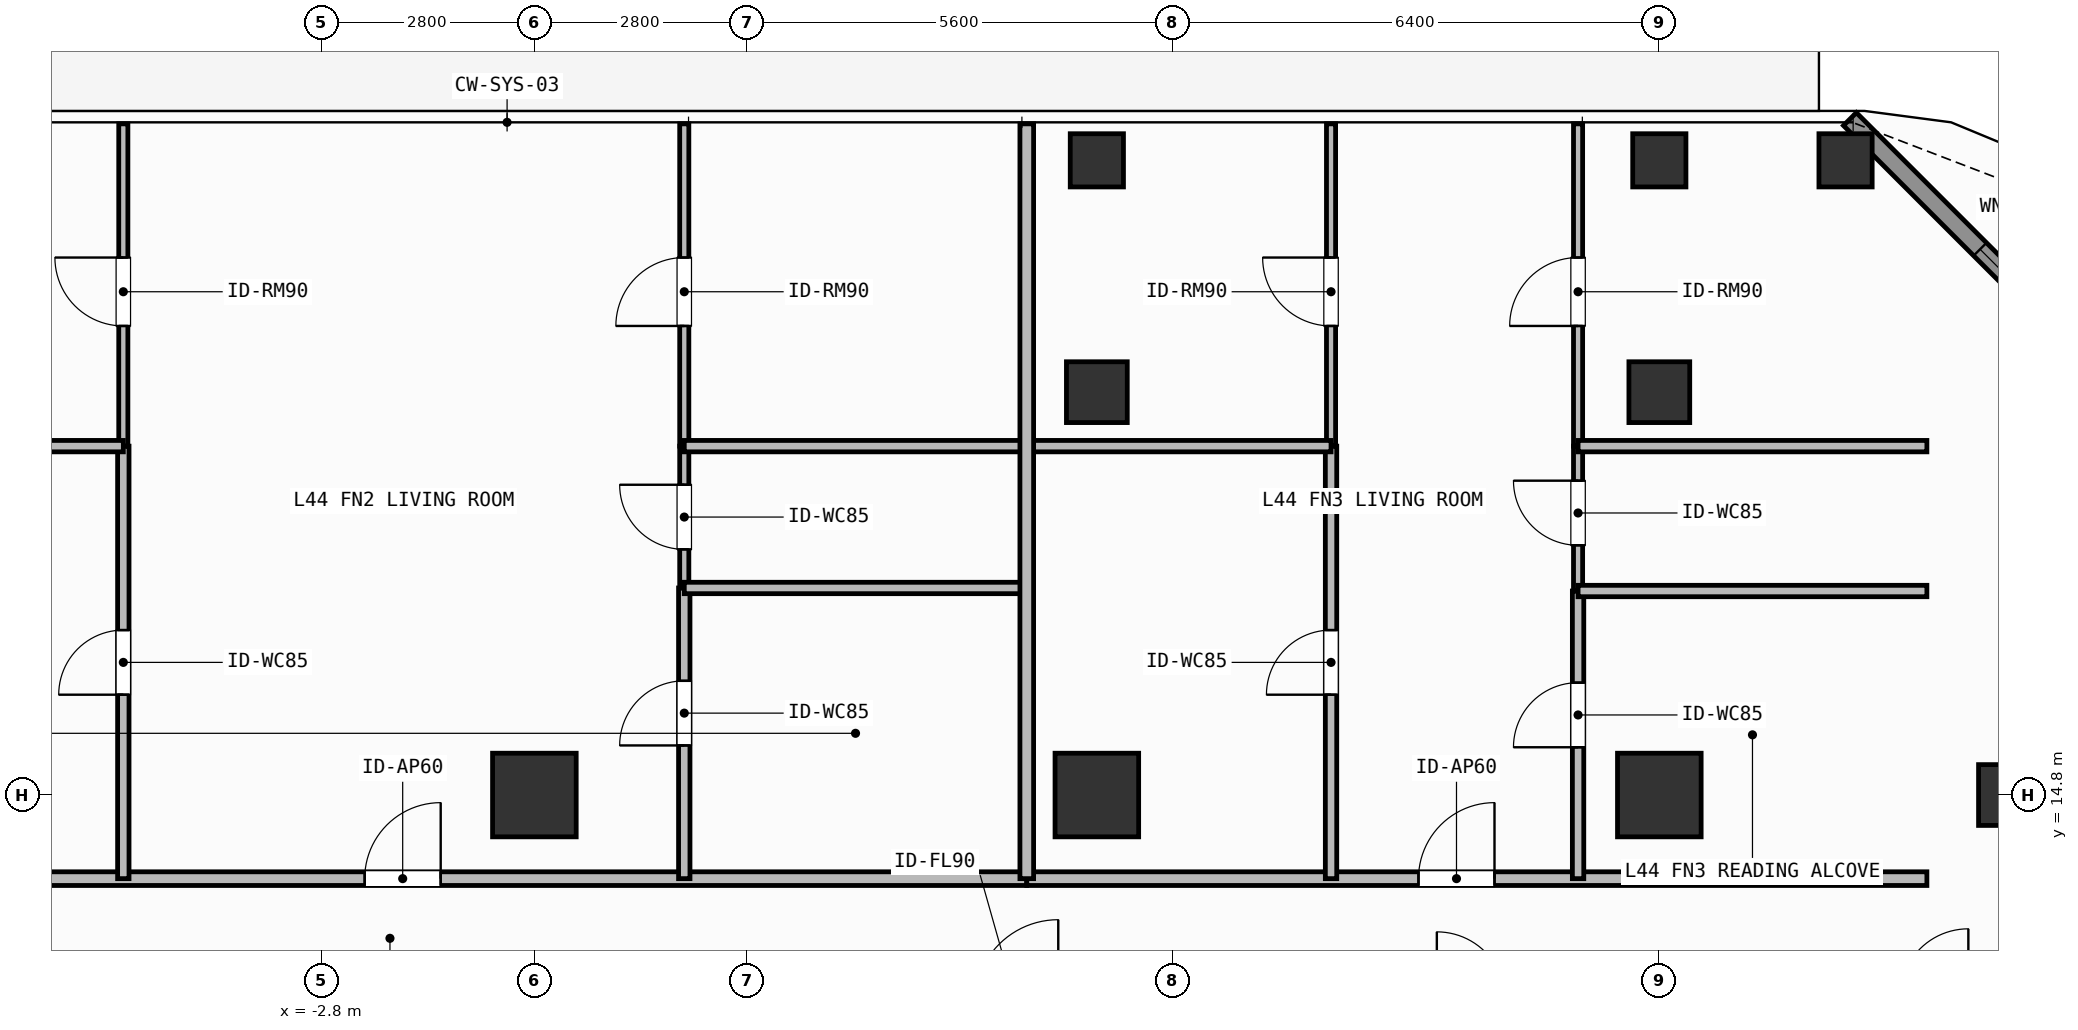
"""IFC4 building model, lengths in metres.
Left out: names, types, materials, properties, quantities, classifications, styles, units other than length and angle.
Written with IfcOpenShell. Run it as: python <this file> out.ifc"""

import sys

from ifc_helpers import new_model, si_unit, direction, frame, frame_2d, origin, origin_2d, place, context, subcontext, project, spatial, rectangle, hollow_rectangle, extrude, element, fill, save


model = new_model("IFC4")
c1 = context("Model", 3, precision=1e-05, world=origin(), true_north=direction((0.0, 1.0)))
c2 = subcontext(c1, "Body", "Model", "MODEL_VIEW")
j1 = project(units=[si_unit("LENGTHUNIT", "METRE"), si_unit("PLANEANGLEUNIT", "RADIAN")], contexts=[c1])
p1 = place(None, origin())
s1 = spatial("IfcSite", under=j1, at=p1, CompositionType="ELEMENT")
p2 = place(p1, origin())
s2 = spatial("IfcBuilding", under=s1, at=p2, CompositionType="ELEMENT")
p3 = place(p2, frame((0.0, 0.0, 179.7)))
s3 = spatial("IfcBuildingStorey", under=s2, at=p3, CompositionType="ELEMENT", Elevation=179.7)
for number, where, z_axis, x_axis in (
    (1, (0.0, 14.8, 0.0), (0.0, 0.0, 1.0), (1.0, 0.0, 0.0)),
    (2, (7.4, 14.8, 0.0), (0.0, 0.0, 1.0), (1.0, 0.0, 0.0)),
    (3, (14.8, 14.8, 0.0), (0.0, 0.0, 1.0), (1.0, 0.0, 0.0)),
):
    element("IfcColumn", number, at=place(p3, frame(where, z_axis=z_axis, x_axis=x_axis)), inside=s3, PredefinedType="COLUMN", context=c2, shape_type="SweptSolid", body=[
        extrude(rectangle(XDim=1.1, YDim=1.1, at=origin_2d()), origin(), (0.0, 0.0, 1.0), 3.9),
    ])
for number, where, z_axis, x_axis in (
    (4, (19.4, 14.8, 0.0), (0.0, 0.0, 1.0), (1.0, 0.0, 0.0)),
    (5, (7.4, 20.1, 0.0), (0.0, 0.0, 1.0), (1.0, 0.0, 0.0)),
    (6, (14.8, 20.1, 0.0), (0.0, 0.0, 1.0), (1.0, 0.0, 0.0)),
):
    element("IfcColumn", number, at=place(p3, frame(where, z_axis=z_axis, x_axis=x_axis)), inside=s3, PredefinedType="COLUMN", context=c2, shape_type="SweptSolid", body=[
        extrude(hollow_rectangle(XDim=0.8, YDim=0.8, WallThickness=0.036, at=origin_2d()), origin(), (0.0, 0.0, 1.0), 3.9),
    ])
for number, where, z_axis, x_axis in (
    (7, (17.25, 23.15, 0.0), (0.0, 0.0, 1.0), (1.0, 0.0, 0.0)),
    (8, (7.4, 23.15, 0.0), (0.0, 0.0, 1.0), (1.0, 0.0, 0.0)),
    (9, (14.8, 23.15, 0.0), (0.0, 0.0, 1.0), (1.0, 0.0, 0.0)),
):
    element("IfcColumn", number, at=place(p3, frame(where, z_axis=z_axis, x_axis=x_axis)), inside=s3, PredefinedType="COLUMN", context=c2, shape_type="SweptSolid", body=[
        extrude(hollow_rectangle(XDim=0.7, YDim=0.7, WallThickness=0.032, at=origin_2d()), origin(), (0.0, 0.0, 1.0), 3.9),
    ])
p4 = place(p3, frame((17.308, 23.692, 0.0), z_axis=(0.0, 0.0, 1.0), x_axis=(0.707106781187, -0.707106781187, 0.0)))
e10 = element("IfcWall", 10, at=p4, inside=s3, PredefinedType="SOLIDWALL", context=c2, shape_type="SweptSolid", body=[
    extrude(rectangle(XDim=6.343, YDim=0.24, at=frame_2d((3.171, 0.0))), origin(), (0.0, 0.0, 1.0), 3.68),
])
p5 = place(p4, frame((2.421, 0.0, 0.8)))
e11 = element("IfcOpeningElement", 11, at=p5, cuts=e10, PredefinedType="OPENING", context=c2, shape_type="SweptSolid", body=[
    extrude(rectangle(XDim=1.5, YDim=1.85, at=frame_2d((0.75, 0.925))), frame((0.0, 0.13, 0.0), z_axis=(0.0, -1.0, 0.0), x_axis=(1.0, 0.0, 0.0)), (0.0, 0.0, 1.0), 0.26),
])
p6 = place(p3, frame((-12.28, 13.7, 0.0), z_axis=(0.0, 0.0, 1.0), x_axis=(1.0, 0.0, 0.0)))
e12 = element("IfcWall", 12, at=p6, inside=s3, PredefinedType="PARTITIONING", context=c2, shape_type="SweptSolid", body=[
    extrude(rectangle(XDim=18.758, YDim=0.18, at=frame_2d((9.379, 0.0))), origin(), (0.0, 0.0, 1.0), 3.68),
])
p7 = place(p6, frame((10.048, 0.0, 0.0)))
e13 = element("IfcOpeningElement", 13, at=p7, cuts=e12, PredefinedType="OPENING", context=c2, shape_type="SweptSolid", body=[
    extrude(rectangle(XDim=1.0, YDim=2.2, at=frame_2d((0.5, 1.1))), frame((0.0, 0.1, 0.0), z_axis=(0.0, -1.0, 0.0), x_axis=(1.0, 0.0, 0.0)), (0.0, 0.0, 1.0), 0.2),
])
p8 = place(p3, frame((-5.408, 13.7, 0.0), z_axis=(0.0, 0.0, 1.0), x_axis=(0.0, 1.0, 0.0)))
e14 = element("IfcWall", 14, at=p8, inside=s3, PredefinedType="PARTITIONING", context=c2, shape_type="SweptSolid", body=[
    extrude(rectangle(XDim=5.69, YDim=0.15, at=frame_2d((2.845, 0.0))), origin(), (0.0, 0.0, 1.0), 3.68),
])
p9 = place(p8, frame((2.42, 0.0, 0.0)))
e15 = element("IfcOpeningElement", 15, at=p9, cuts=e14, PredefinedType="OPENING", context=c2, shape_type="SweptSolid", body=[
    extrude(rectangle(XDim=0.85, YDim=2.1, at=frame_2d((0.425, 1.05))), frame((0.0, 0.085, 0.0), z_axis=(0.0, -1.0, 0.0), x_axis=(1.0, 0.0, 0.0)), (0.0, 0.0, 1.0), 0.17),
])
p10 = place(p3, frame((-5.408, 19.39, 0.0), z_axis=(0.0, 0.0, 1.0), x_axis=(0.0, 1.0, 0.0)))
e16 = element("IfcWall", 16, at=p10, inside=s3, PredefinedType="PARTITIONING", context=c2, shape_type="SweptSolid", body=[
    extrude(rectangle(XDim=4.24, YDim=0.12, at=frame_2d((2.12, 0.0))), origin(), (0.0, 0.0, 1.0), 3.68),
])
p11 = place(p10, frame((1.581, 0.0, 0.0)))
e17 = element("IfcOpeningElement", 17, at=p11, cuts=e16, PredefinedType="OPENING", context=c2, shape_type="SweptSolid", body=[
    extrude(rectangle(XDim=0.9, YDim=2.1, at=frame_2d((0.45, 1.05))), frame((0.0, 0.07, 0.0), z_axis=(0.0, -1.0, 0.0), x_axis=(1.0, 0.0, 0.0)), (0.0, 0.0, 1.0), 0.14),
])
p12 = place(p3, frame((1.972, 13.7, 0.0), z_axis=(0.0, 0.0, 1.0), x_axis=(0.0, 1.0, 0.0)))
e18 = element("IfcWall", 18, at=p12, inside=s3, PredefinedType="PARTITIONING", context=c2, shape_type="SweptSolid", body=[
    extrude(rectangle(XDim=3.824, YDim=0.15, at=frame_2d((1.912, 0.0))), origin(), (0.0, 0.0, 1.0), 3.68),
])
p13 = place(p12, frame((1.752, 0.0, 0.0)))
e19 = element("IfcOpeningElement", 19, at=p13, cuts=e18, PredefinedType="OPENING", context=c2, shape_type="SweptSolid", body=[
    extrude(rectangle(XDim=0.85, YDim=2.1, at=frame_2d((0.425, 1.05))), frame((0.0, 0.085, 0.0), z_axis=(0.0, -1.0, 0.0), x_axis=(1.0, 0.0, 0.0)), (0.0, 0.0, 1.0), 0.17),
])
p14 = place(p3, frame((1.972, 17.524, 0.0), z_axis=(0.0, 0.0, 1.0), x_axis=(0.0, 1.0, 0.0)))
e20 = element("IfcWall", 20, at=p14, inside=s3, PredefinedType="PARTITIONING", context=c2, shape_type="SweptSolid", body=[
    extrude(rectangle(XDim=1.866, YDim=0.12, at=frame_2d((0.933, 0.0))), origin(), (0.0, 0.0, 1.0), 3.68),
])
p15 = place(p14, frame((0.508, 0.0, 0.0)))
e21 = element("IfcOpeningElement", 21, at=p15, cuts=e20, PredefinedType="OPENING", context=c2, shape_type="SweptSolid", body=[
    extrude(rectangle(XDim=0.85, YDim=2.1, at=frame_2d((0.425, 1.05))), frame((0.0, 0.07, 0.0), z_axis=(0.0, -1.0, 0.0), x_axis=(1.0, 0.0, 0.0)), (0.0, 0.0, 1.0), 0.14),
])
p16 = place(p3, frame((1.972, 19.39, 0.0), z_axis=(0.0, 0.0, 1.0), x_axis=(0.0, 1.0, 0.0)))
e22 = element("IfcWall", 22, at=p16, inside=s3, PredefinedType="PARTITIONING", context=c2, shape_type="SweptSolid", body=[
    extrude(rectangle(XDim=4.24, YDim=0.12, at=frame_2d((2.12, 0.0))), origin(), (0.0, 0.0, 1.0), 3.68),
])
p17 = place(p16, frame((1.581, 0.0, 0.0)))
e23 = element("IfcOpeningElement", 23, at=p17, cuts=e22, PredefinedType="OPENING", context=c2, shape_type="SweptSolid", body=[
    extrude(rectangle(XDim=0.9, YDim=2.1, at=frame_2d((0.45, 1.05))), frame((0.0, 0.07, 0.0), z_axis=(0.0, -1.0, 0.0), x_axis=(1.0, 0.0, 0.0)), (0.0, 0.0, 1.0), 0.14),
])
p18 = place(p3, frame((6.478, 13.7, 0.0), z_axis=(0.0, 0.0, 1.0), x_axis=(1.0, 0.0, 0.0)))
e24 = element("IfcWall", 24, at=p18, inside=s3, PredefinedType="PARTITIONING", context=c2, shape_type="SweptSolid", body=[
    extrude(rectangle(XDim=11.842, YDim=0.18, at=frame_2d((5.921, 0.0))), origin(), (0.0, 0.0, 1.0), 3.68),
])
p19 = place(p18, frame((5.154, 0.0, 0.0)))
e25 = element("IfcOpeningElement", 25, at=p19, cuts=e24, PredefinedType="OPENING", context=c2, shape_type="SweptSolid", body=[
    extrude(rectangle(XDim=1.0, YDim=2.2, at=frame_2d((0.5, 1.1))), frame((0.0, 0.1, 0.0), z_axis=(0.0, -1.0, 0.0), x_axis=(1.0, 0.0, 0.0)), (0.0, 0.0, 1.0), 0.2),
])
p20 = place(p3, frame((10.481, 13.7, 0.0), z_axis=(0.0, 0.0, 1.0), x_axis=(0.0, 1.0, 0.0)))
e26 = element("IfcWall", 26, at=p20, inside=s3, PredefinedType="PARTITIONING", context=c2, shape_type="SweptSolid", body=[
    extrude(rectangle(XDim=5.69, YDim=0.15, at=frame_2d((2.845, 0.0))), origin(), (0.0, 0.0, 1.0), 3.68),
])
p21 = place(p20, frame((2.42, 0.0, 0.0)))
e27 = element("IfcOpeningElement", 27, at=p21, cuts=e26, PredefinedType="OPENING", context=c2, shape_type="SweptSolid", body=[
    extrude(rectangle(XDim=0.85, YDim=2.1, at=frame_2d((0.425, 1.05))), frame((0.0, 0.085, 0.0), z_axis=(0.0, -1.0, 0.0), x_axis=(1.0, 0.0, 0.0)), (0.0, 0.0, 1.0), 0.17),
])
p22 = place(p3, frame((10.481, 19.39, 0.0), z_axis=(0.0, 0.0, 1.0), x_axis=(0.0, 1.0, 0.0)))
e28 = element("IfcWall", 28, at=p22, inside=s3, PredefinedType="PARTITIONING", context=c2, shape_type="SweptSolid", body=[
    extrude(rectangle(XDim=4.24, YDim=0.12, at=frame_2d((2.12, 0.0))), origin(), (0.0, 0.0, 1.0), 3.68),
])
p23 = place(p22, frame((1.581, 0.0, 0.0)))
e29 = element("IfcOpeningElement", 29, at=p23, cuts=e28, PredefinedType="OPENING", context=c2, shape_type="SweptSolid", body=[
    extrude(rectangle(XDim=0.9, YDim=2.1, at=frame_2d((0.45, 1.05))), frame((0.0, 0.07, 0.0), z_axis=(0.0, -1.0, 0.0), x_axis=(1.0, 0.0, 0.0)), (0.0, 0.0, 1.0), 0.14),
])
p24 = place(p3, frame((13.731, 13.7, 0.0), z_axis=(0.0, 0.0, 1.0), x_axis=(0.0, 1.0, 0.0)))
e30 = element("IfcWall", 30, at=p24, inside=s3, PredefinedType="PARTITIONING", context=c2, shape_type="SweptSolid", body=[
    extrude(rectangle(XDim=3.784, YDim=0.15, at=frame_2d((1.892, 0.0))), origin(), (0.0, 0.0, 1.0), 3.68),
])
p25 = place(p24, frame((1.729, 0.0, 0.0)))
e31 = element("IfcOpeningElement", 31, at=p25, cuts=e30, PredefinedType="OPENING", context=c2, shape_type="SweptSolid", body=[
    extrude(rectangle(XDim=0.85, YDim=2.1, at=frame_2d((0.425, 1.05))), frame((0.0, 0.085, 0.0), z_axis=(0.0, -1.0, 0.0), x_axis=(1.0, 0.0, 0.0)), (0.0, 0.0, 1.0), 0.17),
])
p26 = place(p3, frame((13.731, 17.484, 0.0), z_axis=(0.0, 0.0, 1.0), x_axis=(0.0, 1.0, 0.0)))
e32 = element("IfcWall", 32, at=p26, inside=s3, PredefinedType="PARTITIONING", context=c2, shape_type="SweptSolid", body=[
    extrude(rectangle(XDim=1.906, YDim=0.12, at=frame_2d((0.953, 0.0))), origin(), (0.0, 0.0, 1.0), 3.68),
])
p27 = place(p26, frame((0.602, 0.0, 0.0)))
e33 = element("IfcOpeningElement", 33, at=p27, cuts=e32, PredefinedType="OPENING", context=c2, shape_type="SweptSolid", body=[
    extrude(rectangle(XDim=0.85, YDim=2.1, at=frame_2d((0.425, 1.05))), frame((0.0, 0.07, 0.0), z_axis=(0.0, -1.0, 0.0), x_axis=(1.0, 0.0, 0.0)), (0.0, 0.0, 1.0), 0.14),
])
p28 = place(p3, frame((13.731, 19.39, 0.0), z_axis=(0.0, 0.0, 1.0), x_axis=(0.0, 1.0, 0.0)))
e34 = element("IfcWall", 34, at=p28, inside=s3, PredefinedType="PARTITIONING", context=c2, shape_type="SweptSolid", body=[
    extrude(rectangle(XDim=4.24, YDim=0.12, at=frame_2d((2.12, 0.0))), origin(), (0.0, 0.0, 1.0), 3.68),
])
p29 = place(p28, frame((1.581, 0.0, 0.0)))
e35 = element("IfcOpeningElement", 35, at=p29, cuts=e34, PredefinedType="OPENING", context=c2, shape_type="SweptSolid", body=[
    extrude(rectangle(XDim=0.9, YDim=2.1, at=frame_2d((0.45, 1.05))), frame((0.0, 0.07, 0.0), z_axis=(0.0, -1.0, 0.0), x_axis=(1.0, 0.0, 0.0)), (0.0, 0.0, 1.0), 0.14),
])
p30 = place(p3, frame((-12.28, 19.39, 0.0), z_axis=(0.0, 0.0, 1.0), x_axis=(1.0, 0.0, 0.0)))
e36 = element("IfcWall", 36, at=p30, inside=s3, PredefinedType="PARTITIONING", context=c2, shape_type="SweptSolid", body=[
    extrude(rectangle(XDim=6.872, YDim=0.15, at=frame_2d((3.436, 0.0))), origin(), (0.0, 0.0, 1.0), 3.68),
])
for number, where, z_axis, x_axis in (
    (37, (1.972, 17.524, 0.0), (0.0, 0.0, 1.0), (1.0, 0.0, 0.0)),
    (38, (1.972, 19.39, 0.0), (0.0, 0.0, 1.0), (1.0, 0.0, 0.0)),
):
    element("IfcWall", number, at=place(p3, frame(where, z_axis=z_axis, x_axis=x_axis)), inside=s3, PredefinedType="PARTITIONING", context=c2, shape_type="SweptSolid", body=[
        extrude(rectangle(XDim=4.506, YDim=0.15, at=frame_2d((2.253, 0.0))), origin(), (0.0, 0.0, 1.0), 3.68),
    ])
p31 = place(p3, frame((6.478, 19.39, 0.0), z_axis=(0.0, 0.0, 1.0), x_axis=(1.0, 0.0, 0.0)))
e39 = element("IfcWall", 39, at=p31, inside=s3, PredefinedType="PARTITIONING", context=c2, shape_type="SweptSolid", body=[
    extrude(rectangle(XDim=4.003, YDim=0.15, at=frame_2d((2.001, 0.0))), origin(), (0.0, 0.0, 1.0), 3.68),
])
for number, where, z_axis, x_axis in (
    (40, (13.731, 17.484, 0.0), (0.0, 0.0, 1.0), (1.0, 0.0, 0.0)),
    (41, (13.731, 19.39, 0.0), (0.0, 0.0, 1.0), (1.0, 0.0, 0.0)),
):
    element("IfcWall", number, at=place(p3, frame(where, z_axis=z_axis, x_axis=x_axis)), inside=s3, PredefinedType="PARTITIONING", context=c2, shape_type="SweptSolid", body=[
        extrude(rectangle(XDim=4.589, YDim=0.15, at=frame_2d((2.294, 0.0))), origin(), (0.0, 0.0, 1.0), 3.68),
    ])
p32 = place(p3, frame((6.478, 13.7, 0.0), z_axis=(0.0, 0.0, 1.0), x_axis=(0.0, 1.0, 0.0)))
e42 = element("IfcWall", 42, at=p32, inside=s3, PredefinedType="PARTITIONING", context=c2, shape_type="SweptSolid", body=[
    extrude(rectangle(XDim=9.93, YDim=0.18, at=frame_2d((4.965, 0.0))), origin(), (0.0, 0.0, 1.0), 3.68),
])
p33 = place(p5, origin())
e43 = element("IfcWindow", 43, at=p33, inside=s3, PartitioningType="SINGLE_PANEL", PredefinedType="WINDOW", context=c2, shape_type="SweptSolid", body=[
    extrude(rectangle(XDim=1.5, YDim=1.85, at=frame_2d((0.75, 0.925))), frame((0.0, 0.03, 0.0), z_axis=(0.0, -1.0, 0.0), x_axis=(1.0, 0.0, 0.0)), (0.0, 0.0, 1.0), 0.06),
])
fill(e11, e43)
p34 = place(p7, origin())
e44 = element("IfcDoor", 44, at=p34, inside=s3, OperationType="SINGLE_SWING_RIGHT", PredefinedType="DOOR", context=c2, shape_type="SweptSolid", body=[
    extrude(rectangle(XDim=1.0, YDim=2.2, at=frame_2d((0.5, 1.1))), frame((0.0, 0.025, 0.0), z_axis=(0.0, -1.0, 0.0), x_axis=(1.0, 0.0, 0.0)), (0.0, 0.0, 1.0), 0.05),
])
fill(e13, e44)
p35 = place(p9, origin())
e45 = element("IfcDoor", 45, at=p35, inside=s3, OperationType="SINGLE_SWING_LEFT", PredefinedType="DOOR", context=c2, shape_type="SweptSolid", body=[
    extrude(rectangle(XDim=0.85, YDim=2.1, at=frame_2d((0.425, 1.05))), frame((0.0, 0.025, 0.0), z_axis=(0.0, -1.0, 0.0), x_axis=(1.0, 0.0, 0.0)), (0.0, 0.0, 1.0), 0.05),
])
fill(e15, e45)
p36 = place(p11, origin())
e46 = element("IfcDoor", 46, at=p36, inside=s3, OperationType="SINGLE_SWING_RIGHT", PredefinedType="DOOR", context=c2, shape_type="SweptSolid", body=[
    extrude(rectangle(XDim=0.9, YDim=2.1, at=frame_2d((0.45, 1.05))), frame((0.0, 0.025, 0.0), z_axis=(0.0, -1.0, 0.0), x_axis=(1.0, 0.0, 0.0)), (0.0, 0.0, 1.0), 0.05),
])
fill(e17, e46)
p37 = place(p13, origin())
e47 = element("IfcDoor", 47, at=p37, inside=s3, OperationType="SINGLE_SWING_LEFT", PredefinedType="DOOR", context=c2, shape_type="SweptSolid", body=[
    extrude(rectangle(XDim=0.85, YDim=2.1, at=frame_2d((0.425, 1.05))), frame((0.0, 0.025, 0.0), z_axis=(0.0, -1.0, 0.0), x_axis=(1.0, 0.0, 0.0)), (0.0, 0.0, 1.0), 0.05),
])
fill(e19, e47)
p38 = place(p15, origin())
e48 = element("IfcDoor", 48, at=p38, inside=s3, OperationType="SINGLE_SWING_RIGHT", PredefinedType="DOOR", context=c2, shape_type="SweptSolid", body=[
    extrude(rectangle(XDim=0.85, YDim=2.1, at=frame_2d((0.425, 1.05))), frame((0.0, 0.025, 0.0), z_axis=(0.0, -1.0, 0.0), x_axis=(1.0, 0.0, 0.0)), (0.0, 0.0, 1.0), 0.05),
])
fill(e21, e48)
p39 = place(p17, origin())
e49 = element("IfcDoor", 49, at=p39, inside=s3, OperationType="SINGLE_SWING_LEFT", PredefinedType="DOOR", context=c2, shape_type="SweptSolid", body=[
    extrude(rectangle(XDim=0.9, YDim=2.1, at=frame_2d((0.45, 1.05))), frame((0.0, 0.025, 0.0), z_axis=(0.0, -1.0, 0.0), x_axis=(1.0, 0.0, 0.0)), (0.0, 0.0, 1.0), 0.05),
])
fill(e23, e49)
p40 = place(p19, origin())
e50 = element("IfcDoor", 50, at=p40, inside=s3, OperationType="SINGLE_SWING_RIGHT", PredefinedType="DOOR", context=c2, shape_type="SweptSolid", body=[
    extrude(rectangle(XDim=1.0, YDim=2.2, at=frame_2d((0.5, 1.1))), frame((0.0, 0.025, 0.0), z_axis=(0.0, -1.0, 0.0), x_axis=(1.0, 0.0, 0.0)), (0.0, 0.0, 1.0), 0.05),
])
fill(e25, e50)
p41 = place(p21, origin())
e51 = element("IfcDoor", 51, at=p41, inside=s3, OperationType="SINGLE_SWING_LEFT", PredefinedType="DOOR", context=c2, shape_type="SweptSolid", body=[
    extrude(rectangle(XDim=0.85, YDim=2.1, at=frame_2d((0.425, 1.05))), frame((0.0, 0.025, 0.0), z_axis=(0.0, -1.0, 0.0), x_axis=(1.0, 0.0, 0.0)), (0.0, 0.0, 1.0), 0.05),
])
fill(e27, e51)
p42 = place(p23, origin())
e52 = element("IfcDoor", 52, at=p42, inside=s3, OperationType="SINGLE_SWING_RIGHT", PredefinedType="DOOR", context=c2, shape_type="SweptSolid", body=[
    extrude(rectangle(XDim=0.9, YDim=2.1, at=frame_2d((0.45, 1.05))), frame((0.0, 0.025, 0.0), z_axis=(0.0, -1.0, 0.0), x_axis=(1.0, 0.0, 0.0)), (0.0, 0.0, 1.0), 0.05),
])
fill(e29, e52)
p43 = place(p25, origin())
e53 = element("IfcDoor", 53, at=p43, inside=s3, OperationType="SINGLE_SWING_LEFT", PredefinedType="DOOR", context=c2, shape_type="SweptSolid", body=[
    extrude(rectangle(XDim=0.85, YDim=2.1, at=frame_2d((0.425, 1.05))), frame((0.0, 0.025, 0.0), z_axis=(0.0, -1.0, 0.0), x_axis=(1.0, 0.0, 0.0)), (0.0, 0.0, 1.0), 0.05),
])
fill(e31, e53)
p44 = place(p27, origin())
e54 = element("IfcDoor", 54, at=p44, inside=s3, OperationType="SINGLE_SWING_RIGHT", PredefinedType="DOOR", context=c2, shape_type="SweptSolid", body=[
    extrude(rectangle(XDim=0.85, YDim=2.1, at=frame_2d((0.425, 1.05))), frame((0.0, 0.025, 0.0), z_axis=(0.0, -1.0, 0.0), x_axis=(1.0, 0.0, 0.0)), (0.0, 0.0, 1.0), 0.05),
])
fill(e33, e54)
p45 = place(p29, origin())
e55 = element("IfcDoor", 55, at=p45, inside=s3, OperationType="SINGLE_SWING_LEFT", PredefinedType="DOOR", context=c2, shape_type="SweptSolid", body=[
    extrude(rectangle(XDim=0.9, YDim=2.1, at=frame_2d((0.45, 1.05))), frame((0.0, 0.025, 0.0), z_axis=(0.0, -1.0, 0.0), x_axis=(1.0, 0.0, 0.0)), (0.0, 0.0, 1.0), 0.05),
])
fill(e35, e55)
save(model, sys.argv[1])
